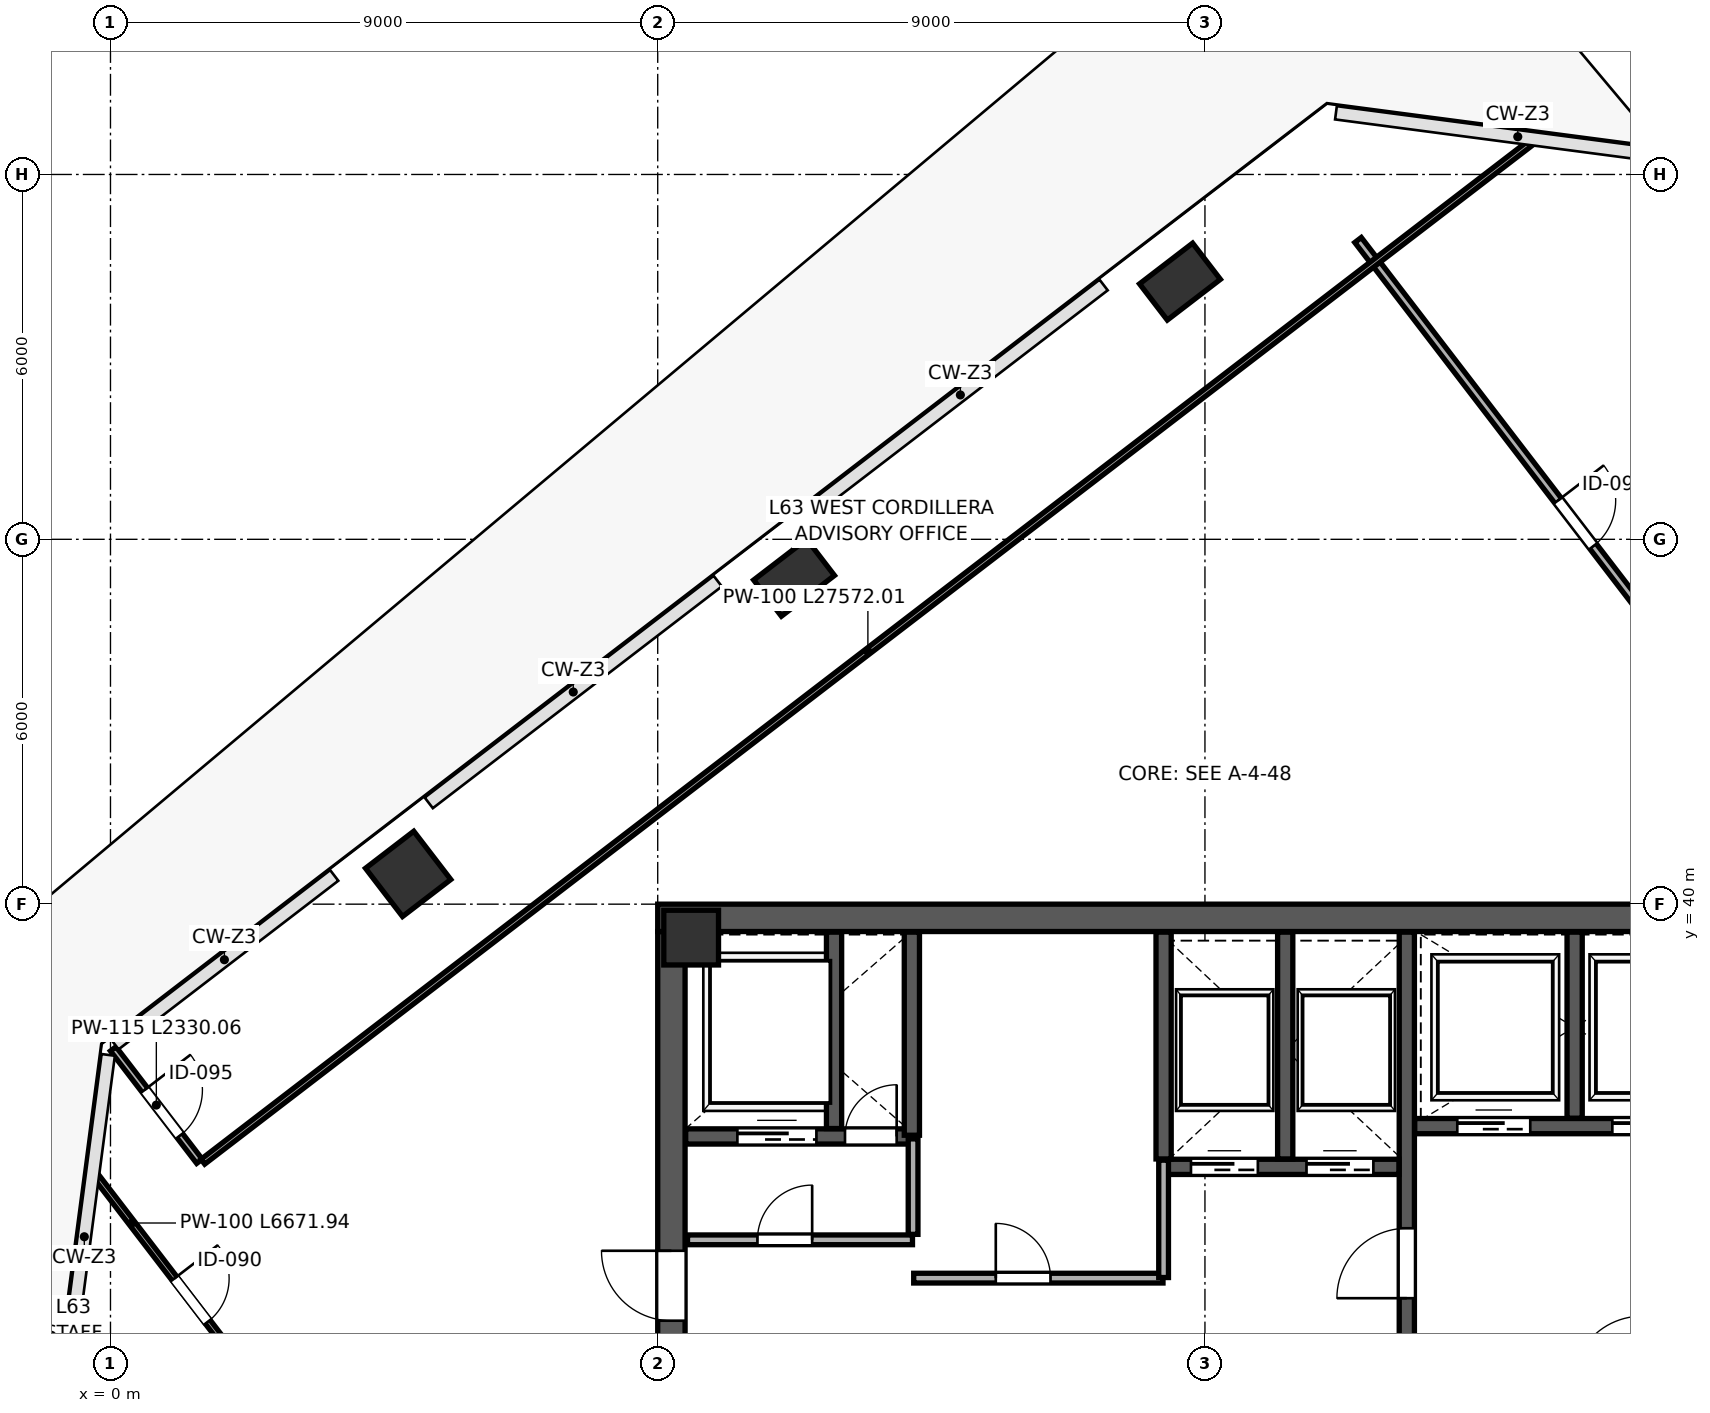
"""IFC4 building model, lengths in metres.
Left out: names, types, materials, properties, quantities, classifications, styles, units other than length and angle.
Written with IfcOpenShell. Run it as: python <this file> out.ifc"""

import sys

from ifc_helpers import new_model, si_unit, direction, frame, frame_2d, origin, origin_2d, place, context, subcontext, project, spatial, rectangle, extrude, source, transform, mapped, element, fill, save


model = new_model("IFC4")
c1 = context("Model", 3, precision=1e-05, world=origin(), true_north=direction((0.0, 1.0)))
c2 = subcontext(c1, "Body", "Model", "MODEL_VIEW")
j1 = project(units=[si_unit("LENGTHUNIT", "METRE"), si_unit("PLANEANGLEUNIT", "RADIAN")], contexts=[c1])
p1 = place(None, origin())
s1 = spatial("IfcSite", under=j1, at=p1, CompositionType="ELEMENT")
p2 = place(p1, origin())
s2 = spatial("IfcBuilding", under=s1, at=p2, CompositionType="ELEMENT")
p3 = place(p2, frame((0.0, 0.0, 279.4)))
s3 = spatial("IfcBuildingStorey", under=s2, at=p3, CompositionType="ELEMENT", Elevation=279.4)
m1 = source(origin(), c2, "Body", "SweptSolid", [
    extrude(rectangle(XDim=0.9, YDim=0.9, at=origin_2d()), origin(), (0.0, 0.0, 1.0), 4.199),
])
p4 = place(p3, frame((9.55, 39.45, 0.001), z_axis=(0.0, 0.0, 1.0), x_axis=(1.0, 0.0, 0.0)))
e1 = element("IfcColumn", 1, at=p4, inside=s3, PredefinedType="COLUMN", context=c2, shape_type="MappedRepresentation", body=[
    mapped(m1, transform((0.0, 0.0, 0.0), scale=1.0)),
])
m2 = source(origin(), c2, "Body", "SweptSolid", [
    extrude(rectangle(XDim=1.0, YDim=1.0, at=origin_2d()), origin(), (0.0, 0.0, 1.0), 4.199),
])
p5 = place(p3, frame((4.896, 40.498, 0.001), z_axis=(0.0, 0.0, 1.0), x_axis=(-0.608761429009, 0.793353340291, 0.0)))
e2 = element("IfcColumn", 2, at=p5, inside=s3, PredefinedType="COLUMN", context=c2, shape_type="MappedRepresentation", body=[
    mapped(m2, transform((0.0, 0.0, 0.0), scale=1.0)),
])
m3 = source(origin(), c2, "Body", "SweptSolid", [
    extrude(rectangle(XDim=0.75, YDim=1.1, at=origin_2d()), origin(), (0.0, 0.0, 1.0), 4.199),
])
for number, where, z_axis, x_axis in (
    (3, (11.242, 45.368, 0.001), (0.0, 0.0, 1.0), (-0.609, 0.793, 0.0)),
    (4, (17.589, 50.238, 0.001), (0.0, 0.0, 1.0), (-0.609, 0.793, 0.0)),
):
    element("IfcColumn", number, at=place(p3, frame(where, z_axis=z_axis, x_axis=x_axis)), inside=s3, PredefinedType="PILASTER", context=c2, shape_type="MappedRepresentation", body=[
        mapped(m3, transform((0.0, 0.0, 0.0), scale=1.0)),
    ])
p6 = place(p3, frame((9.225, 24.45, 0.0), z_axis=(0.0, 0.0, 1.0), x_axis=(0.0, 1.0, 0.0)))
e5 = element("IfcWall", 5, at=p6, inside=s3, PredefinedType="SHEAR", context=c2, shape_type="SweptSolid", body=[
    extrude(rectangle(XDim=15.1, YDim=0.45, at=frame_2d((7.55, 0.0))), origin(), (0.0, 0.0, 1.0), 3.96),
])
p7 = place(p6, frame((8.7, 0.0, 0.0)))
e6 = element("IfcOpeningElement", 6, at=p7, cuts=e5, PredefinedType="OPENING", context=c2, shape_type="SweptSolid", body=[
    extrude(rectangle(XDim=1.15, YDim=2.2, at=frame_2d((0.575, 1.1))), frame((0.0, 0.235, 0.0), z_axis=(0.0, -1.0, 0.0), x_axis=(1.0, 0.0, 0.0)), (0.0, 0.0, 1.0), 0.47),
])
p8 = place(p3, frame((9.0, 39.775, 0.0), z_axis=(0.0, 0.0, 1.0), x_axis=(1.0, 0.0, 0.0)))
e7 = element("IfcWall", 7, at=p8, inside=s3, PredefinedType="SHEAR", context=c2, shape_type="SweptSolid", body=[
    extrude(rectangle(XDim=18.0, YDim=0.45, at=frame_2d((9.0, 0.0))), origin(), (0.0, 0.0, 1.0), 3.96),
])
p9 = place(p3, frame((21.32, 32.12, 0.0), z_axis=(0.0, 0.0, 1.0), x_axis=(0.0, 1.0, 0.0)))
e8 = element("IfcWall", 8, at=p9, inside=s3, PredefinedType="SHEAR", context=c2, shape_type="SweptSolid", body=[
    extrude(rectangle(XDim=7.42, YDim=0.25, at=frame_2d((3.71, 0.0))), origin(), (0.0, 0.0, 1.0), 3.96),
])
p10 = place(p9, frame((1.4, 0.0, 0.0)))
e9 = element("IfcOpeningElement", 9, at=p10, cuts=e8, PredefinedType="OPENING", context=c2, shape_type="SweptSolid", body=[
    extrude(rectangle(XDim=1.15, YDim=2.2, at=frame_2d((0.575, 1.1))), frame((0.0, 0.135, 0.0), z_axis=(0.0, -1.0, 0.0), x_axis=(1.0, 0.0, 0.0)), (0.0, 0.0, 1.0), 0.27),
])
p11 = place(p3, frame((9.46, 36.18, 0.0), z_axis=(0.0, 0.0, 1.0), x_axis=(1.0, 0.0, 0.0)))
e10 = element("IfcWall", 10, at=p11, inside=s3, PredefinedType="SHEAR", context=c2, shape_type="SweptSolid", body=[
    extrude(rectangle(XDim=3.79, YDim=0.25, at=frame_2d((1.895, 0.0))), origin(), (0.0, 0.0, 1.0), 3.96),
])
p12 = place(p11, frame((2.62, 0.0, 0.0)))
e11 = element("IfcOpeningElement", 11, at=p12, cuts=e10, PredefinedType="OPENING", context=c2, shape_type="SweptSolid", body=[
    extrude(rectangle(XDim=0.85, YDim=2.1, at=frame_2d((0.425, 1.05))), frame((0.0, 0.135, 0.0), z_axis=(0.0, -1.0, 0.0), x_axis=(1.0, 0.0, 0.0)), (0.0, 0.0, 1.0), 0.27),
])
p13 = place(p11, frame((0.85, 0.0, 0.0)))
e12 = element("IfcOpeningElement", 12, at=p13, cuts=e10, PredefinedType="OPENING", context=c2, shape_type="SweptSolid", body=[
    extrude(rectangle(XDim=1.3, YDim=2.25, at=frame_2d((0.65, 1.125))), frame((0.0, 0.135, 0.0), z_axis=(0.0, -1.0, 0.0), x_axis=(1.0, 0.0, 0.0)), (0.0, 0.0, 1.0), 0.27),
])
p14 = place(p3, frame((11.9, 36.31, 0.0), z_axis=(0.0, 0.0, 1.0), x_axis=(0.0, 1.0, 0.0)))
e13 = element("IfcWall", 13, at=p14, inside=s3, PredefinedType="SHEAR", context=c2, shape_type="SweptSolid", body=[
    extrude(rectangle(XDim=3.23, YDim=0.25, at=frame_2d((1.615, 0.0))), origin(), (0.0, 0.0, 1.0), 3.96),
])
p15 = place(p3, frame((21.45, 36.35, 0.0), z_axis=(0.0, 0.0, 1.0), x_axis=(1.0, 0.0, 0.0)))
e14 = element("IfcWall", 14, at=p15, inside=s3, PredefinedType="SHEAR", context=c2, shape_type="SweptSolid", body=[
    extrude(rectangle(XDim=5.09, YDim=0.25, at=frame_2d((2.545, 0.0))), origin(), (0.0, 0.0, 1.0), 3.96),
])
p16 = place(p15, frame((0.7, 0.0, 0.0)))
e15 = element("IfcOpeningElement", 15, at=p16, cuts=e14, PredefinedType="OPENING", context=c2, shape_type="SweptSolid", body=[
    extrude(rectangle(XDim=1.2, YDim=2.2, at=frame_2d((0.6, 1.1))), frame((0.0, 0.135, 0.0), z_axis=(0.0, -1.0, 0.0), x_axis=(1.0, 0.0, 0.0)), (0.0, 0.0, 1.0), 0.27),
])
p17 = place(p15, frame((3.25, 0.0, 0.0)))
e16 = element("IfcOpeningElement", 16, at=p17, cuts=e14, PredefinedType="OPENING", context=c2, shape_type="SweptSolid", body=[
    extrude(rectangle(XDim=1.2, YDim=2.2, at=frame_2d((0.6, 1.1))), frame((0.0, 0.135, 0.0), z_axis=(0.0, -1.0, 0.0), x_axis=(1.0, 0.0, 0.0)), (0.0, 0.0, 1.0), 0.27),
])
p18 = place(p3, frame((24.08, 36.48, 0.0), z_axis=(0.0, 0.0, 1.0), x_axis=(0.0, 1.0, 0.0)))
e17 = element("IfcWall", 17, at=p18, inside=s3, PredefinedType="SHEAR", context=c2, shape_type="SweptSolid", body=[
    extrude(rectangle(XDim=3.06, YDim=0.25, at=frame_2d((1.53, 0.0))), origin(), (0.0, 0.0, 1.0), 3.96),
])
p19 = place(p3, frame((13.18, 36.2, 0.0), z_axis=(0.0, 0.0, 1.0), x_axis=(0.0, 1.0, 0.0)))
e18 = element("IfcWall", 18, at=p19, inside=s3, PredefinedType="SHEAR", context=c2, shape_type="SweptSolid", body=[
    extrude(rectangle(XDim=3.34, YDim=0.25, at=frame_2d((1.67, 0.0))), origin(), (0.0, 0.0, 1.0), 3.96),
])
p20 = place(p3, frame((17.32, 35.68, 0.0), z_axis=(0.0, 0.0, 1.0), x_axis=(1.0, 0.0, 0.0)))
e19 = element("IfcWall", 19, at=p20, inside=s3, PredefinedType="SHEAR", context=c2, shape_type="SweptSolid", body=[
    extrude(rectangle(XDim=3.87, YDim=0.25, at=frame_2d((1.935, 0.0))), origin(), (0.0, 0.0, 1.0), 3.96),
])
p21 = place(p20, frame((0.45, 0.0, 0.0)))
e20 = element("IfcOpeningElement", 20, at=p21, cuts=e19, PredefinedType="OPENING", context=c2, shape_type="SweptSolid", body=[
    extrude(rectangle(XDim=1.1, YDim=2.2, at=frame_2d((0.55, 1.1))), frame((0.0, 0.135, 0.0), z_axis=(0.0, -1.0, 0.0), x_axis=(1.0, 0.0, 0.0)), (0.0, 0.0, 1.0), 0.27),
])
p22 = place(p20, frame((2.35, 0.0, 0.0)))
e21 = element("IfcOpeningElement", 21, at=p22, cuts=e19, PredefinedType="OPENING", context=c2, shape_type="SweptSolid", body=[
    extrude(rectangle(XDim=1.1, YDim=2.2, at=frame_2d((0.55, 1.1))), frame((0.0, 0.135, 0.0), z_axis=(0.0, -1.0, 0.0), x_axis=(1.0, 0.0, 0.0)), (0.0, 0.0, 1.0), 0.27),
])
for number, where, z_axis, x_axis in (
    (22, (17.32, 35.81, 0.0), (0.0, 0.0, 1.0), (0.0, 1.0, 0.0)),
    (23, (19.32, 35.81, 0.0), (0.0, 0.0, 1.0), (0.0, 1.0, 0.0)),
):
    element("IfcWall", number, at=place(p3, frame(where, z_axis=z_axis, x_axis=x_axis)), inside=s3, PredefinedType="SHEAR", context=c2, shape_type="SweptSolid", body=[
        extrude(rectangle(XDim=3.73, YDim=0.25, at=frame_2d((1.865, 0.0))), origin(), (0.0, 0.0, 1.0), 3.96),
    ])
p23 = place(p3, frame((9.49, 34.48, 0.0), z_axis=(0.0, 0.0, 1.0), x_axis=(1.0, 0.0, 0.0)))
e24 = element("IfcWall", 24, at=p23, inside=s3, PredefinedType="PARTITIONING", context=c2, shape_type="SweptSolid", body=[
    extrude(rectangle(XDim=3.7, YDim=0.16, at=frame_2d((1.85, 0.0))), origin(), (0.0, 0.0, 1.0), 3.96),
])
p24 = place(p23, frame((1.15, 0.0, 0.0)))
e25 = element("IfcOpeningElement", 25, at=p24, cuts=e24, PredefinedType="OPENING", context=c2, shape_type="SweptSolid", body=[
    extrude(rectangle(XDim=0.9, YDim=2.15, at=frame_2d((0.45, 1.075))), frame((0.0, 0.09, 0.0), z_axis=(0.0, -1.0, 0.0), x_axis=(1.0, 0.0, 0.0)), (0.0, 0.0, 1.0), 0.18),
])
p25 = place(p3, frame((13.2, 34.57, 0.0), z_axis=(0.0, 0.0, 1.0), x_axis=(0.0, 1.0, 0.0)))
e26 = element("IfcWall", 26, at=p25, inside=s3, PredefinedType="PARTITIONING", context=c2, shape_type="SweptSolid", body=[
    extrude(rectangle(XDim=1.57, YDim=0.16, at=frame_2d((0.785, 0.0))), origin(), (0.0, 0.0, 1.0), 3.96),
])
p26 = place(p3, frame((13.21, 33.85, 0.0), z_axis=(0.0, 0.0, 1.0), x_axis=(1.0, 0.0, 0.0)))
e27 = element("IfcWall", 27, at=p26, inside=s3, PredefinedType="PARTITIONING", context=c2, shape_type="SweptSolid", body=[
    extrude(rectangle(XDim=4.1, YDim=0.16, at=frame_2d((2.05, 0.0))), origin(), (0.0, 0.0, 1.0), 3.96),
])
p27 = place(p26, frame((1.35, 0.0, 0.0)))
e28 = element("IfcOpeningElement", 28, at=p27, cuts=e27, PredefinedType="OPENING", context=c2, shape_type="SweptSolid", body=[
    extrude(rectangle(XDim=0.9, YDim=2.15, at=frame_2d((0.45, 1.075))), frame((0.0, 0.09, 0.0), z_axis=(0.0, -1.0, 0.0), x_axis=(1.0, 0.0, 0.0)), (0.0, 0.0, 1.0), 0.18),
])
p28 = place(p3, frame((17.32, 33.86, 0.0), z_axis=(0.0, 0.0, 1.0), x_axis=(0.0, 1.0, 0.0)))
e29 = element("IfcWall", 29, at=p28, inside=s3, PredefinedType="PARTITIONING", context=c2, shape_type="SweptSolid", body=[
    extrude(rectangle(XDim=1.93, YDim=0.16, at=frame_2d((0.965, 0.0))), origin(), (0.0, 0.0, 1.0), 3.96),
])
p29 = place(p3, frame((-0.258, 35.551, 0.0), z_axis=(0.0, 0.0, 1.0), x_axis=(0.608751837986, -0.79336069965, 0.0)))
e30 = element("IfcWall", 30, at=p29, inside=s3, PredefinedType="PARTITIONING", context=c2, shape_type="SweptSolid", body=[
    extrude(rectangle(XDim=6.672, YDim=0.1, at=frame_2d((3.336, 0.0))), origin(), (0.0, 0.0, 1.0), 3.96),
])
p30 = place(p29, frame((2.15, 0.0, 0.0)))
e31 = element("IfcOpeningElement", 31, at=p30, cuts=e30, PredefinedType="OPENING", context=c2, shape_type="SweptSolid", body=[
    extrude(rectangle(XDim=0.9, YDim=2.15, at=frame_2d((0.45, 1.075))), frame((0.0, 0.06, 0.0), z_axis=(0.0, -1.0, 0.0), x_axis=(1.0, 0.0, 0.0)), (0.0, 0.0, 1.0), 0.12),
])
p31 = place(p29, frame((4.25, 0.0, 0.0)))
e32 = element("IfcOpeningElement", 32, at=p31, cuts=e30, PredefinedType="OPENING", context=c2, shape_type="SweptSolid", body=[
    extrude(rectangle(XDim=0.95, YDim=2.15, at=frame_2d((0.475, 1.075))), frame((0.0, 0.06, 0.0), z_axis=(0.0, -1.0, 0.0), x_axis=(1.0, 0.0, 0.0)), (0.0, 0.0, 1.0), 0.12),
])
p32 = place(p3, frame((20.518, 50.922, 0.0), z_axis=(0.0, 0.0, 1.0), x_axis=(0.608759693778, -0.793354671778, 0.0)))
e33 = element("IfcWall", 33, at=p32, inside=s3, PredefinedType="PARTITIONING", context=c2, shape_type="SweptSolid", body=[
    extrude(rectangle(XDim=26.97, YDim=0.135, at=frame_2d((13.485, 0.0))), origin(), (0.0, 0.0, 1.0), 3.96),
])
p33 = place(p32, frame((5.4, 0.0, 0.0)))
e34 = element("IfcOpeningElement", 34, at=p33, cuts=e33, PredefinedType="OPENING", context=c2, shape_type="SweptSolid", body=[
    extrude(rectangle(XDim=0.95, YDim=2.15, at=frame_2d((0.475, 1.075))), frame((0.0, 0.078, 0.0), z_axis=(0.0, -1.0, 0.0), x_axis=(1.0, 0.0, 0.0)), (0.0, 0.0, 1.0), 0.155),
])
p34 = place(p3, frame((0.045, 37.62, 0.0), z_axis=(0.0, 0.0, 1.0), x_axis=(0.60874824263, -0.793363458381, 0.0)))
e35 = element("IfcWall", 35, at=p34, inside=s3, PredefinedType="PARTITIONING", context=c2, shape_type="SweptSolid", body=[
    extrude(rectangle(XDim=2.33, YDim=0.115, at=frame_2d((1.165, 0.0))), origin(), (0.0, 0.0, 1.0), 3.96),
])
p35 = place(p34, frame((0.85, 0.0, 0.0)))
e36 = element("IfcOpeningElement", 36, at=p35, cuts=e35, PredefinedType="OPENING", context=c2, shape_type="SweptSolid", body=[
    extrude(rectangle(XDim=0.95, YDim=2.15, at=frame_2d((0.475, 1.075))), frame((0.0, 0.067, 0.0), z_axis=(0.0, -1.0, 0.0), x_axis=(1.0, 0.0, 0.0)), (0.0, 0.0, 1.0), 0.135),
])
p36 = place(p3, frame((1.519, 35.764, 0.0), z_axis=(0.0, 0.0, 1.0), x_axis=(0.793353184068, 0.608761632602, 0.0)))
e37 = element("IfcWall", 37, at=p36, inside=s3, PredefinedType="PARTITIONING", context=c2, shape_type="SweptSolid", body=[
    extrude(rectangle(XDim=27.572, YDim=0.1, at=frame_2d((13.786, 0.0))), origin(), (0.0, 0.0, 1.0), 3.96),
])
m4 = source(origin(), c2, "Body", "SweptSolid", [
    extrude(rectangle(XDim=1.15, YDim=2.2, at=frame_2d((0.575, 1.1))), frame((0.0, 0.025, 0.0), z_axis=(0.0, -1.0, 0.0), x_axis=(1.0, 0.0, 0.0)), (0.0, 0.0, 1.0), 0.05),
])
p37 = place(p10, origin())
e38 = element("IfcDoor", 38, at=p37, inside=s3, OperationType="SINGLE_SWING_LEFT", PredefinedType="DOOR", context=c2, shape_type="MappedRepresentation", body=[
    mapped(m4, transform((0.0, 0.0, 0.0), scale=1.0)),
])
fill(e9, e38)
p38 = place(p7, origin())
e39 = element("IfcDoor", 39, at=p38, inside=s3, OperationType="SINGLE_SWING_RIGHT", PredefinedType="DOOR", context=c2, shape_type="MappedRepresentation", body=[
    mapped(m4, transform((0.0, 0.0, 0.0), scale=1.0)),
])
fill(e6, e39)
m5 = source(origin(), c2, "Body", "SweptSolid", [
    extrude(rectangle(XDim=0.85, YDim=2.1, at=frame_2d((0.425, 1.05))), frame((0.0, 0.025, 0.0), z_axis=(0.0, -1.0, 0.0), x_axis=(1.0, 0.0, 0.0)), (0.0, 0.0, 1.0), 0.05),
])
p39 = place(p12, origin())
e40 = element("IfcDoor", 40, at=p39, inside=s3, OperationType="SINGLE_SWING_RIGHT", PredefinedType="DOOR", context=c2, shape_type="MappedRepresentation", body=[
    mapped(m5, transform((0.0, 0.0, 0.0), scale=1.0)),
])
fill(e11, e40)
m6 = source(origin(), c2, "Body", "SweptSolid", [
    extrude(rectangle(XDim=1.1, YDim=2.2, at=frame_2d((0.55, 1.1))), frame((0.0, 0.025, 0.0), z_axis=(0.0, -1.0, 0.0), x_axis=(1.0, 0.0, 0.0)), (0.0, 0.0, 1.0), 0.05),
])
p40 = place(p21, origin())
e41 = element("IfcDoor", 41, at=p40, inside=s3, OperationType="SLIDING_TO_LEFT", PredefinedType="DOOR", context=c2, shape_type="MappedRepresentation", body=[
    mapped(m6, transform((0.0, 0.0, 0.0), scale=1.0)),
])
fill(e20, e41)
p41 = place(p22, origin())
e42 = element("IfcDoor", 42, at=p41, inside=s3, OperationType="SLIDING_TO_RIGHT", PredefinedType="DOOR", context=c2, shape_type="MappedRepresentation", body=[
    mapped(m6, transform((0.0, 0.0, 0.0), scale=1.0)),
])
fill(e21, e42)
m7 = source(origin(), c2, "Body", "SweptSolid", [
    extrude(rectangle(XDim=1.2, YDim=2.2, at=frame_2d((0.6, 1.1))), frame((0.0, 0.025, 0.0), z_axis=(0.0, -1.0, 0.0), x_axis=(1.0, 0.0, 0.0)), (0.0, 0.0, 1.0), 0.05),
])
p42 = place(p16, origin())
e43 = element("IfcDoor", 43, at=p42, inside=s3, OperationType="SLIDING_TO_LEFT", PredefinedType="DOOR", context=c2, shape_type="MappedRepresentation", body=[
    mapped(m7, transform((0.0, 0.0, 0.0), scale=1.0)),
])
fill(e15, e43)
p43 = place(p17, origin())
e44 = element("IfcDoor", 44, at=p43, inside=s3, OperationType="SLIDING_TO_RIGHT", PredefinedType="DOOR", context=c2, shape_type="MappedRepresentation", body=[
    mapped(m7, transform((0.0, 0.0, 0.0), scale=1.0)),
])
fill(e16, e44)
m8 = source(origin(), c2, "Body", "SweptSolid", [
    extrude(rectangle(XDim=1.3, YDim=2.25, at=frame_2d((0.65, 1.125))), frame((0.0, 0.025, 0.0), z_axis=(0.0, -1.0, 0.0), x_axis=(1.0, 0.0, 0.0)), (0.0, 0.0, 1.0), 0.05),
])
p44 = place(p13, origin())
e45 = element("IfcDoor", 45, at=p44, inside=s3, OperationType="SLIDING_TO_LEFT", PredefinedType="DOOR", context=c2, shape_type="MappedRepresentation", body=[
    mapped(m8, transform((0.0, 0.0, 0.0), scale=1.0)),
])
fill(e12, e45)
m9 = source(origin(), c2, "Body", "SweptSolid", [
    extrude(rectangle(XDim=0.9, YDim=2.15, at=frame_2d((0.45, 1.075))), frame((0.0, 0.025, 0.0), z_axis=(0.0, -1.0, 0.0), x_axis=(1.0, 0.0, 0.0)), (0.0, 0.0, 1.0), 0.05),
])
p45 = place(p24, origin())
e46 = element("IfcDoor", 46, at=p45, inside=s3, OperationType="SINGLE_SWING_RIGHT", PredefinedType="DOOR", context=c2, shape_type="MappedRepresentation", body=[
    mapped(m9, transform((0.0, 0.0, 0.0), scale=1.0)),
])
fill(e25, e46)
p46 = place(p27, origin())
e47 = element("IfcDoor", 47, at=p46, inside=s3, OperationType="SINGLE_SWING_LEFT", PredefinedType="DOOR", context=c2, shape_type="MappedRepresentation", body=[
    mapped(m9, transform((0.0, 0.0, 0.0), scale=1.0)),
])
fill(e28, e47)
m10 = source(origin(), c2, "Body", "SweptSolid", [
    extrude(rectangle(XDim=0.9, YDim=2.15, at=frame_2d((0.45, 1.075))), frame((0.0, 0.025, 0.0), z_axis=(0.0, -1.0, 0.0), x_axis=(1.0, 0.0, 0.0)), (0.0, 0.0, 1.0), 0.05),
])
p47 = place(p30, origin())
e48 = element("IfcDoor", 48, at=p47, inside=s3, OperationType="SINGLE_SWING_LEFT", PredefinedType="DOOR", context=c2, shape_type="MappedRepresentation", body=[
    mapped(m10, transform((0.0, 0.0, 0.0), scale=1.0)),
])
fill(e31, e48)
m11 = source(origin(), c2, "Body", "SweptSolid", [
    extrude(rectangle(XDim=0.95, YDim=2.15, at=frame_2d((0.475, 1.075))), frame((0.0, 0.025, 0.0), z_axis=(0.0, -1.0, 0.0), x_axis=(1.0, 0.0, 0.0)), (0.0, 0.0, 1.0), 0.05),
])
p48 = place(p33, origin())
e49 = element("IfcDoor", 49, at=p48, inside=s3, OperationType="SINGLE_SWING_LEFT", PredefinedType="DOOR", context=c2, shape_type="MappedRepresentation", body=[
    mapped(m11, transform((0.0, 0.0, 0.0), scale=1.0)),
])
fill(e34, e49)
p49 = place(p35, origin())
e50 = element("IfcDoor", 50, at=p49, inside=s3, OperationType="SINGLE_SWING_LEFT", PredefinedType="DOOR", context=c2, shape_type="MappedRepresentation", body=[
    mapped(m11, transform((0.0, 0.0, 0.0), scale=1.0)),
])
fill(e36, e50)
save(model, sys.argv[1])
